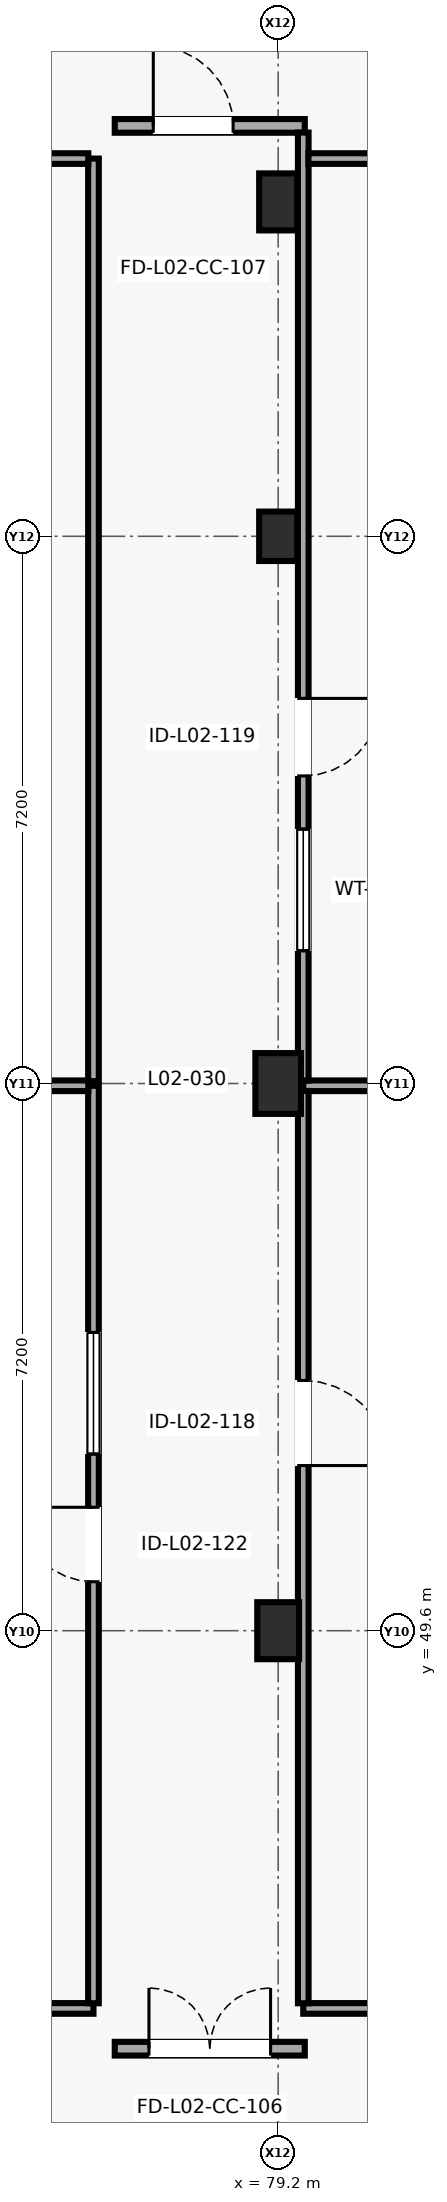
"""IFC4 building model, lengths in metres.
Left out: names, types, materials, properties, quantities, classifications, styles, units other than length and angle.
Written with IfcOpenShell. Run it as: python <this file> out.ifc"""

import sys

from ifc_helpers import new_model, si_unit, direction, frame, frame_2d, origin, origin_2d, place, context, subcontext, project, spatial, rectangle, extrude, element, fill, save


model = new_model("IFC4")
c1 = context("Model", 3, precision=1e-05, world=origin(), true_north=direction((0.0, 1.0)))
c2 = subcontext(c1, "Body", "Model", "MODEL_VIEW")
j1 = project(units=[si_unit("LENGTHUNIT", "METRE"), si_unit("PLANEANGLEUNIT", "RADIAN")], contexts=[c1])
p1 = place(None, origin())
s1 = spatial("IfcSite", under=j1, at=p1, CompositionType="ELEMENT")
p2 = place(p1, origin())
s2 = spatial("IfcBuilding", under=s1, at=p2, CompositionType="ELEMENT")
p3 = place(p2, frame((0.0, 0.0, 8.2)))
s3 = spatial("IfcBuildingStorey", under=s2, at=p3, CompositionType="ELEMENT", Elevation=8.2)
p4 = place(p3, frame((79.2, 49.6, 0.0), z_axis=(0.0, 0.0, 1.0), x_axis=(1.0, 0.0, 0.0)))
e1 = element("IfcColumn", 1, at=p4, inside=s3, PredefinedType="COLUMN", context=c2, shape_type="SweptSolid", body=[
    extrude(rectangle(XDim=0.55, YDim=0.75, at=origin_2d()), origin(), (0.0, 0.0, 1.0), 4.0),
])
p5 = place(p3, frame((79.2, 56.8, 0.0), z_axis=(0.0, 0.0, 1.0), x_axis=(1.0, 0.0, 0.0)))
e2 = element("IfcColumn", 2, at=p5, inside=s3, PredefinedType="COLUMN", context=c2, shape_type="SweptSolid", body=[
    extrude(rectangle(XDim=0.6, YDim=0.8, at=origin_2d()), origin(), (0.0, 0.0, 1.0), 4.0),
])
p6 = place(p3, frame((79.2, 64.0, 0.0), z_axis=(0.0, 0.0, 1.0), x_axis=(1.0, 0.0, 0.0)))
e3 = element("IfcColumn", 3, at=p6, inside=s3, PredefinedType="COLUMN", context=c2, shape_type="SweptSolid", body=[
    extrude(rectangle(XDim=0.5, YDim=0.65, at=origin_2d()), origin(), (0.0, 0.0, 1.0), 4.0),
])
p7 = place(p3, frame((79.2, 68.4, 0.0), z_axis=(0.0, 0.0, 1.0), x_axis=(1.0, 0.0, 0.0)))
e4 = element("IfcColumn", 4, at=p7, inside=s3, PredefinedType="COLUMN", context=c2, shape_type="SweptSolid", body=[
    extrude(rectangle(XDim=0.5, YDim=0.75, at=origin_2d()), origin(), (0.0, 0.0, 1.0), 4.0),
])
p8 = place(p3, frame((77.05, 44.1, 0.0), z_axis=(0.0, 0.0, 1.0), x_axis=(1.0, 0.0, 0.0)))
e5 = element("IfcWall", 5, at=p8, inside=s3, PredefinedType="PARTITIONING", context=c2, shape_type="SweptSolid", body=[
    extrude(rectangle(XDim=2.5, YDim=0.18, at=frame_2d((1.25, 0.0))), origin(), (0.0, 0.0, 1.0), 3.78),
])
p9 = place(p8, frame((0.45, 0.0, 0.0)))
e6 = element("IfcOpeningElement", 6, at=p9, cuts=e5, PredefinedType="OPENING", context=c2, shape_type="SweptSolid", body=[
    extrude(rectangle(XDim=1.6, YDim=2.25, at=frame_2d((0.8, 1.125))), frame((0.0, 0.1, 0.0), z_axis=(0.0, -1.0, 0.0), x_axis=(1.0, 0.0, 0.0)), (0.0, 0.0, 1.0), 0.2),
])
p10 = place(p3, frame((77.05, 69.4, 0.0), z_axis=(0.0, 0.0, 1.0), x_axis=(1.0, 0.0, 0.0)))
e7 = element("IfcWall", 7, at=p10, inside=s3, PredefinedType="PARTITIONING", context=c2, shape_type="SweptSolid", body=[
    extrude(rectangle(XDim=2.5, YDim=0.18, at=frame_2d((1.25, 0.0))), origin(), (0.0, 0.0, 1.0), 3.78),
])
p11 = place(p10, frame((0.507, 0.0, 0.0)))
e8 = element("IfcOpeningElement", 8, at=p11, cuts=e7, PredefinedType="OPENING", context=c2, shape_type="SweptSolid", body=[
    extrude(rectangle(XDim=1.05, YDim=2.15, at=frame_2d((0.525, 1.075))), frame((0.0, 0.1, 0.0), z_axis=(0.0, -1.0, 0.0), x_axis=(1.0, 0.0, 0.0)), (0.0, 0.0, 1.0), 0.2),
])
p12 = place(p3, frame((79.53, 44.63, 0.0), z_axis=(0.0, 0.0, 1.0), x_axis=(1.0, 0.0, 0.0)))
e9 = element("IfcWall", 9, at=p12, inside=s3, PredefinedType="PARTITIONING", context=c2, shape_type="SweptSolid", body=[
    extrude(rectangle(XDim=8.44, YDim=0.14, at=frame_2d((4.22, 0.0))), origin(), (0.0, 0.0, 1.0), 3.775),
])
p13 = place(p3, frame((87.902, 56.77, 0.0), z_axis=(0.0, 0.0, 1.0), x_axis=(-1.0, 0.0, 0.0)))
e10 = element("IfcWall", 10, at=p13, inside=s3, PredefinedType="PARTITIONING", context=c2, shape_type="SweptSolid", body=[
    extrude(rectangle(XDim=8.372, YDim=0.14, at=frame_2d((4.186, 0.0))), origin(), (0.0, 0.0, 1.0), 2.975),
])
p14 = place(p3, frame((79.53, 56.702, 0.0), z_axis=(0.0, 0.0, 1.0), x_axis=(0.0, -1.0, 0.0)))
e11 = element("IfcWall", 11, at=p14, inside=s3, PredefinedType="PARTITIONING", context=c2, shape_type="SweptSolid", body=[
    extrude(rectangle(XDim=12.004, YDim=0.14, at=frame_2d((6.002, 0.0))), origin(), (0.0, 0.0, 1.0), 3.775),
])
p15 = place(p14, frame((3.809, 0.0, 0.0)))
e12 = element("IfcOpeningElement", 12, at=p15, cuts=e11, PredefinedType="OPENING", context=c2, shape_type="SweptSolid", body=[
    extrude(rectangle(XDim=1.12, YDim=2.18, at=frame_2d((0.56, 1.09))), frame((0.0, 0.08, 0.0), z_axis=(0.0, -1.0, 0.0), x_axis=(1.0, 0.0, 0.0)), (0.0, 0.0, 1.0), 0.16),
])
p16 = place(p3, frame((79.53, 69.312, 0.0), z_axis=(0.0, 0.0, 1.0), x_axis=(0.0, -1.0, 0.0)))
e13 = element("IfcWall", 13, at=p16, inside=s3, PredefinedType="PARTITIONING", context=c2, shape_type="SweptSolid", body=[
    extrude(rectangle(XDim=12.474, YDim=0.14, at=frame_2d((6.237, 0.0))), origin(), (0.0, 0.0, 1.0), 3.775),
])
p17 = place(p16, frame((7.445, 0.0, 0.0)))
e14 = element("IfcOpeningElement", 14, at=p17, cuts=e13, PredefinedType="OPENING", context=c2, shape_type="SweptSolid", body=[
    extrude(rectangle(XDim=1.02, YDim=2.14, at=frame_2d((0.51, 1.07))), frame((0.0, 0.08, 0.0), z_axis=(0.0, -1.0, 0.0), x_axis=(1.0, 0.0, 0.0)), (0.0, 0.0, 1.0), 0.16),
])
p18 = place(p16, frame((9.165, 0.0, 1.05)))
e15 = element("IfcOpeningElement", 15, at=p18, cuts=e13, PredefinedType="OPENING", context=c2, shape_type="SweptSolid", body=[
    extrude(rectangle(XDim=1.6, YDim=1.1, at=frame_2d((0.8, 0.55))), frame((0.0, 0.08, 0.0), z_axis=(0.0, -1.0, 0.0), x_axis=(1.0, 0.0, 0.0)), (0.0, 0.0, 1.0), 0.16),
])
p19 = place(p3, frame((87.902, 68.97, 0.0), z_axis=(0.0, 0.0, 1.0), x_axis=(-1.0, 0.0, 0.0)))
e16 = element("IfcWall", 16, at=p19, inside=s3, PredefinedType="PARTITIONING", context=c2, shape_type="SweptSolid", body=[
    extrude(rectangle(XDim=8.304, YDim=0.14, at=frame_2d((4.152, 0.0))), origin(), (0.0, 0.0, 1.0), 3.775),
])
p20 = place(p3, frame((63.43, 44.63, 0.0), z_axis=(0.0, 0.0, 1.0), x_axis=(1.0, 0.0, 0.0)))
e17 = element("IfcWall", 17, at=p20, inside=s3, PredefinedType="PARTITIONING", context=c2, shape_type="SweptSolid", body=[
    extrude(rectangle(XDim=13.34, YDim=0.14, at=frame_2d((6.67, 0.0))), origin(), (0.0, 0.0, 1.0), 3.775),
])
p21 = place(p3, frame((76.77, 44.698, 0.0), z_axis=(0.0, 0.0, 1.0), x_axis=(0.0, 1.0, 0.0)))
e18 = element("IfcWall", 18, at=p21, inside=s3, PredefinedType="PARTITIONING", context=c2, shape_type="SweptSolid", body=[
    extrude(rectangle(XDim=12.072, YDim=0.14, at=frame_2d((6.036, 0.0))), origin(), (0.0, 0.0, 1.0), 3.775),
])
p22 = place(p21, frame((5.546, 0.0, 0.0)))
e19 = element("IfcOpeningElement", 19, at=p22, cuts=e18, PredefinedType="OPENING", context=c2, shape_type="SweptSolid", body=[
    extrude(rectangle(XDim=0.98, YDim=2.12, at=frame_2d((0.49, 1.06))), frame((0.0, 0.08, 0.0), z_axis=(0.0, -1.0, 0.0), x_axis=(1.0, 0.0, 0.0)), (0.0, 0.0, 1.0), 0.16),
])
p23 = place(p21, frame((7.226, 0.0, 1.05)))
e20 = element("IfcOpeningElement", 20, at=p23, cuts=e18, PredefinedType="OPENING", context=c2, shape_type="SweptSolid", body=[
    extrude(rectangle(XDim=1.6, YDim=1.1, at=frame_2d((0.8, 0.55))), frame((0.0, 0.08, 0.0), z_axis=(0.0, -1.0, 0.0), x_axis=(1.0, 0.0, 0.0)), (0.0, 0.0, 1.0), 0.16),
])
p24 = place(p3, frame((76.702, 56.77, 0.0), z_axis=(0.0, 0.0, 1.0), x_axis=(-1.0, 0.0, 0.0)))
e21 = element("IfcWall", 21, at=p24, inside=s3, PredefinedType="PARTITIONING", context=c2, shape_type="SweptSolid", body=[
    extrude(rectangle(XDim=2.086, YDim=0.14, at=frame_2d((1.043, 0.0))), origin(), (0.0, 0.0, 1.0), 3.775),
])
p25 = place(p3, frame((76.77, 56.83, 0.0), z_axis=(0.0, 0.0, 1.0), x_axis=(0.0, 1.0, 0.0)))
e22 = element("IfcWall", 22, at=p25, inside=s3, PredefinedType="PARTITIONING", context=c2, shape_type="SweptSolid", body=[
    extrude(rectangle(XDim=12.14, YDim=0.14, at=frame_2d((6.07, 0.0))), origin(), (0.0, 0.0, 1.0), 3.775),
])
p26 = place(p3, frame((76.702, 68.97, 0.0), z_axis=(0.0, 0.0, 1.0), x_axis=(-1.0, 0.0, 0.0)))
e23 = element("IfcWall", 23, at=p26, inside=s3, PredefinedType="PARTITIONING", context=c2, shape_type="SweptSolid", body=[
    extrude(rectangle(XDim=13.272, YDim=0.14, at=frame_2d((6.636, 0.0))), origin(), (0.0, 0.0, 1.0), 3.775),
])
p27 = place(p26, frame((6.036, 0.0, 0.0)))
e24 = element("IfcOpeningElement", 24, at=p27, cuts=e23, PredefinedType="OPENING", context=c2, shape_type="SweptSolid", body=[
    extrude(rectangle(XDim=1.2, YDim=2.15, at=frame_2d((0.6, 1.075))), frame((0.0, 0.08, 0.0), z_axis=(0.0, -1.0, 0.0), x_axis=(1.0, 0.0, 0.0)), (0.0, 0.0, 1.0), 0.16),
])
p28 = place(p26, frame((7.936, 0.0, 1.05)))
e25 = element("IfcOpeningElement", 25, at=p28, cuts=e23, PredefinedType="OPENING", context=c2, shape_type="SweptSolid", body=[
    extrude(rectangle(XDim=1.8, YDim=1.2, at=frame_2d((0.9, 0.6))), frame((0.0, 0.08, 0.0), z_axis=(0.0, -1.0, 0.0), x_axis=(1.0, 0.0, 0.0)), (0.0, 0.0, 1.0), 0.16),
])
p29 = place(p9, origin())
e26 = element("IfcDoor", 26, at=p29, inside=s3, OperationType="DOUBLE_DOOR_SINGLE_SWING", PredefinedType="DOOR", context=c2, shape_type="SweptSolid", body=[
    extrude(rectangle(XDim=1.6, YDim=2.25, at=frame_2d((0.8, 1.125))), frame((0.0, 0.025, 0.0), z_axis=(0.0, -1.0, 0.0), x_axis=(1.0, 0.0, 0.0)), (0.0, 0.0, 1.0), 0.05),
])
fill(e6, e26)
p30 = place(p11, origin())
e27 = element("IfcDoor", 27, at=p30, inside=s3, OperationType="SINGLE_SWING_LEFT", PredefinedType="DOOR", context=c2, shape_type="SweptSolid", body=[
    extrude(rectangle(XDim=1.05, YDim=2.15, at=frame_2d((0.525, 1.075))), frame((0.0, 0.025, 0.0), z_axis=(0.0, -1.0, 0.0), x_axis=(1.0, 0.0, 0.0)), (0.0, 0.0, 1.0), 0.05),
])
fill(e8, e27)
p31 = place(p15, origin())
e28 = element("IfcDoor", 28, at=p31, inside=s3, OperationType="SINGLE_SWING_RIGHT", PredefinedType="DOOR", context=c2, shape_type="SweptSolid", body=[
    extrude(rectangle(XDim=1.12, YDim=2.18, at=frame_2d((0.56, 1.09))), frame((0.0, 0.025, 0.0), z_axis=(0.0, -1.0, 0.0), x_axis=(1.0, 0.0, 0.0)), (0.0, 0.0, 1.0), 0.05),
])
fill(e12, e28)
p32 = place(p17, origin())
e29 = element("IfcDoor", 29, at=p32, inside=s3, OperationType="SINGLE_SWING_LEFT", PredefinedType="DOOR", context=c2, shape_type="SweptSolid", body=[
    extrude(rectangle(XDim=1.02, YDim=2.14, at=frame_2d((0.51, 1.07))), frame((0.0, 0.025, 0.0), z_axis=(0.0, -1.0, 0.0), x_axis=(1.0, 0.0, 0.0)), (0.0, 0.0, 1.0), 0.05),
])
fill(e14, e29)
p33 = place(p18, origin())
e30 = element("IfcWindow", 30, at=p33, inside=s3, PartitioningType="SINGLE_PANEL", PredefinedType="WINDOW", context=c2, shape_type="SweptSolid", body=[
    extrude(rectangle(XDim=1.6, YDim=1.1, at=frame_2d((0.8, 0.55))), frame((0.0, 0.03, 0.0), z_axis=(0.0, -1.0, 0.0), x_axis=(1.0, 0.0, 0.0)), (0.0, 0.0, 1.0), 0.06),
])
fill(e15, e30)
p34 = place(p22, origin())
e31 = element("IfcDoor", 31, at=p34, inside=s3, OperationType="SINGLE_SWING_RIGHT", PredefinedType="DOOR", context=c2, shape_type="SweptSolid", body=[
    extrude(rectangle(XDim=0.98, YDim=2.12, at=frame_2d((0.49, 1.06))), frame((0.0, 0.025, 0.0), z_axis=(0.0, -1.0, 0.0), x_axis=(1.0, 0.0, 0.0)), (0.0, 0.0, 1.0), 0.05),
])
fill(e19, e31)
p35 = place(p23, origin())
e32 = element("IfcWindow", 32, at=p35, inside=s3, PartitioningType="SINGLE_PANEL", PredefinedType="WINDOW", context=c2, shape_type="SweptSolid", body=[
    extrude(rectangle(XDim=1.6, YDim=1.1, at=frame_2d((0.8, 0.55))), frame((0.0, 0.03, 0.0), z_axis=(0.0, -1.0, 0.0), x_axis=(1.0, 0.0, 0.0)), (0.0, 0.0, 1.0), 0.06),
])
fill(e20, e32)
save(model, sys.argv[1])
